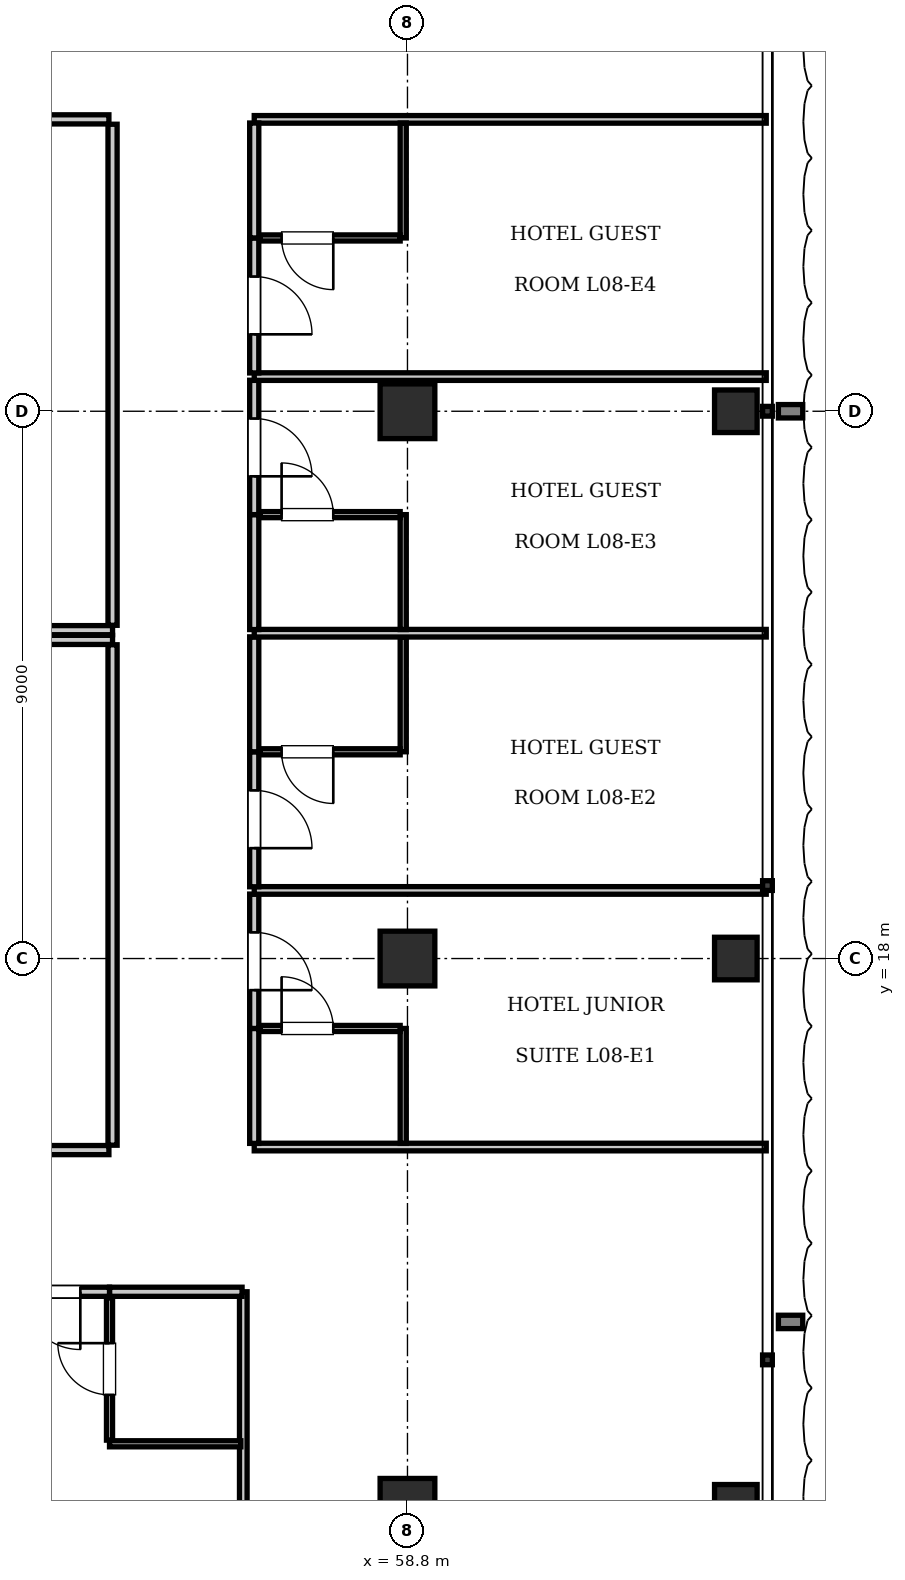
"""IFC4 building model, lengths in metres.
Left out: names, types, materials, properties, quantities, classifications, styles, units other than length and angle.
Written with IfcOpenShell. Run it as: python <this file> out.ifc"""

import sys

from ifc_helpers import new_model, si_unit, direction, frame, frame_2d, origin, origin_2d, place, context, subcontext, project, spatial, rectangle, i_section, extrude, element, fill, save


model = new_model("IFC4")
c1 = context("Model", 3, precision=1e-05, world=origin(), true_north=direction((0.0, 1.0)))
c2 = subcontext(c1, "Body", "Model", "MODEL_VIEW")
j1 = project(units=[si_unit("LENGTHUNIT", "METRE"), si_unit("PLANEANGLEUNIT", "RADIAN")], contexts=[c1])
p1 = place(None, origin())
s1 = spatial("IfcSite", under=j1, at=p1, CompositionType="ELEMENT")
p2 = place(p1, origin())
s2 = spatial("IfcBuilding", under=s1, at=p2, CompositionType="ELEMENT")
p3 = place(p2, frame((0.0, 0.0, 38.5)))
s3 = spatial("IfcBuildingStorey", under=s2, at=p3, CompositionType="ELEMENT", Elevation=38.5)
for number, where, z_axis, x_axis in (
    (1, (58.8, 9.0, 0.0), (0.0, 0.0, 1.0), (1.0, 0.0, 0.0)),
    (2, (58.8, 18.0, 0.0), (0.0, 0.0, 1.0), (1.0, 0.0, 0.0)),
    (3, (58.8, 27.0, 0.0), (0.0, 0.0, 1.0), (1.0, 0.0, 0.0)),
):
    element("IfcColumn", number, at=place(p3, frame(where, z_axis=z_axis, x_axis=x_axis)), inside=s3, PredefinedType="COLUMN", context=c2, shape_type="SweptSolid", body=[
        extrude(rectangle(XDim=0.9, YDim=0.9, at=origin_2d()), origin(), (0.0, 0.0, 1.0), 3.85),
    ])
for number, where, z_axis, x_axis in (
    (4, (64.2, 9.0, 0.0), (0.0, 0.0, 1.0), (1.0, 0.0, 0.0)),
    (5, (64.2, 18.0, 0.0), (0.0, 0.0, 1.0), (1.0, 0.0, 0.0)),
    (6, (64.2, 27.0, 0.0), (0.0, 0.0, 1.0), (1.0, 0.0, 0.0)),
):
    element("IfcColumn", number, at=place(p3, frame(where, z_axis=z_axis, x_axis=x_axis)), inside=s3, PredefinedType="COLUMN", context=c2, shape_type="SweptSolid", body=[
        extrude(i_section(OverallWidth=0.7, OverallDepth=0.7, WebThickness=0.028, FlangeThickness=0.044, at=origin_2d()), origin(), (0.0, 0.0, 1.0), 3.85),
    ])
p4 = place(p3, frame((21.65, 23.4, 0.0), z_axis=(0.0, 0.0, 1.0), x_axis=(1.0, 0.0, 0.0)))
e7 = element("IfcWall", 7, at=p4, inside=s3, PredefinedType="PARTITIONING", context=c2, shape_type="SweptSolid", body=[
    extrude(rectangle(XDim=32.3, YDim=0.15, at=frame_2d((16.15, 0.0))), origin(), (0.0, 0.0, 1.0), 3.61),
])
p5 = place(p3, frame((53.95, 23.48, 0.0), z_axis=(0.0, 0.0, 1.0), x_axis=(0.0, 1.0, 0.0)))
e8 = element("IfcWall", 8, at=p5, inside=s3, PredefinedType="PARTITIONING", context=c2, shape_type="SweptSolid", body=[
    extrude(rectangle(XDim=8.24, YDim=0.15, at=frame_2d((4.12, 0.0))), origin(), (0.0, 0.0, 1.0), 3.61),
])
p6 = place(p3, frame((42.998, 31.8, 0.0), z_axis=(0.0, 0.0, 1.0), x_axis=(1.0, 0.0, 0.0)))
e9 = element("IfcWall", 9, at=p6, inside=s3, PredefinedType="PARTITIONING", context=c2, shape_type="SweptSolid", body=[
    extrude(rectangle(XDim=10.892, YDim=0.15, at=frame_2d((5.446, 0.0))), origin(), (0.0, 0.0, 1.0), 3.61),
])
p7 = place(p6, frame((4.996, 0.0, 0.0)))
e10 = element("IfcOpeningElement", 10, at=p7, cuts=e9, PredefinedType="OPENING", context=c2, shape_type="SweptSolid", body=[
    extrude(rectangle(XDim=0.9, YDim=2.1, at=frame_2d((0.45, 1.05))), frame((0.0, 0.085, 0.0), z_axis=(0.0, -1.0, 0.0), x_axis=(1.0, 0.0, 0.0)), (0.0, 0.0, 1.0), 0.17),
])
p8 = place(p3, frame((21.65, 23.24, 0.0), z_axis=(0.0, 0.0, 1.0), x_axis=(1.0, 0.0, 0.0)))
e11 = element("IfcWall", 11, at=p8, inside=s3, PredefinedType="PARTITIONING", context=c2, shape_type="SweptSolid", body=[
    extrude(rectangle(XDim=32.3, YDim=0.15, at=frame_2d((16.15, 0.0))), origin(), (0.0, 0.0, 1.0), 3.61),
])
p9 = place(p3, frame((53.95, 14.93, 0.0), z_axis=(0.0, 0.0, 1.0), x_axis=(0.0, 1.0, 0.0)))
e12 = element("IfcWall", 12, at=p9, inside=s3, PredefinedType="PARTITIONING", context=c2, shape_type="SweptSolid", body=[
    extrude(rectangle(XDim=8.23, YDim=0.15, at=frame_2d((4.115, 0.0))), origin(), (0.0, 0.0, 1.0), 3.61),
])
p10 = place(p3, frame((33.631, 14.85, 0.0), z_axis=(0.0, 0.0, 1.0), x_axis=(1.0, 0.0, 0.0)))
e13 = element("IfcWall", 13, at=p10, inside=s3, PredefinedType="PARTITIONING", context=c2, shape_type="SweptSolid", body=[
    extrude(rectangle(XDim=20.259, YDim=0.15, at=frame_2d((10.129, 0.0))), origin(), (0.0, 0.0, 1.0), 3.61),
])
p11 = place(p10, frame((9.679, 0.0, 0.0)))
e14 = element("IfcOpeningElement", 14, at=p11, cuts=e13, PredefinedType="OPENING", context=c2, shape_type="SweptSolid", body=[
    extrude(rectangle(XDim=0.9, YDim=2.1, at=frame_2d((0.45, 1.05))), frame((0.0, 0.085, 0.0), z_axis=(0.0, -1.0, 0.0), x_axis=(1.0, 0.0, 0.0)), (0.0, 0.0, 1.0), 0.17),
])
p12 = place(p3, frame((56.1, 0.1, 0.0), z_axis=(0.0, 0.0, 1.0), x_axis=(0.0, 1.0, 0.0)))
e15 = element("IfcWall", 15, at=p12, inside=s3, PredefinedType="PARTITIONING", context=c2, shape_type="SweptSolid", body=[
    extrude(rectangle(XDim=12.42, YDim=0.125, at=frame_2d((6.21, 0.0))), origin(), (0.0, 0.0, 1.0), 3.61),
])
p13 = place(p3, frame((53.9, 12.52, 0.0), z_axis=(0.0, 0.0, 1.0), x_axis=(1.0, 0.0, 0.0)))
e16 = element("IfcWall", 16, at=p13, inside=s3, PredefinedType="PARTITIONING", context=c2, shape_type="SweptSolid", body=[
    extrude(rectangle(XDim=2.18, YDim=0.15, at=frame_2d((1.09, 0.0))), origin(), (0.0, 0.0, 1.0), 3.61),
])
p14 = place(p3, frame((53.9, 10.02, 0.0), z_axis=(0.0, 0.0, 1.0), x_axis=(1.0, 0.0, 0.0)))
e17 = element("IfcWall", 17, at=p14, inside=s3, PredefinedType="PARTITIONING", context=c2, shape_type="SweptSolid", body=[
    extrude(rectangle(XDim=2.16, YDim=0.1, at=frame_2d((1.08, 0.0))), origin(), (0.0, 0.0, 1.0), 3.61),
])
p15 = place(p3, frame((53.9, 10.08, 0.0), z_axis=(0.0, 0.0, 1.0), x_axis=(0.0, 1.0, 0.0)))
e18 = element("IfcWall", 18, at=p15, inside=s3, PredefinedType="PARTITIONING", context=c2, shape_type="SweptSolid", body=[
    extrude(rectangle(XDim=2.34, YDim=0.1, at=frame_2d((1.17, 0.0))), origin(), (0.0, 0.0, 1.0), 3.61),
])
p16 = place(p15, frame((0.745, 0.0, 0.0)))
e19 = element("IfcOpeningElement", 19, at=p16, cuts=e18, PredefinedType="OPENING", context=c2, shape_type="SweptSolid", body=[
    extrude(rectangle(XDim=0.85, YDim=2.1, at=frame_2d((0.425, 1.05))), frame((0.0, 0.06, 0.0), z_axis=(0.0, -1.0, 0.0), x_axis=(1.0, 0.0, 0.0)), (0.0, 0.0, 1.0), 0.12),
])
p17 = place(p3, frame((51.99, 12.52, 0.0), z_axis=(0.0, 0.0, 1.0), x_axis=(1.0, 0.0, 0.0)))
e20 = element("IfcWall", 20, at=p17, inside=s3, PredefinedType="PARTITIONING", context=c2, shape_type="SweptSolid", body=[
    extrude(rectangle(XDim=1.91, YDim=0.15, at=frame_2d((0.955, 0.0))), origin(), (0.0, 0.0, 1.0), 3.61),
])
p18 = place(p17, frame((0.48, 0.0, 0.0)))
e21 = element("IfcOpeningElement", 21, at=p18, cuts=e20, PredefinedType="OPENING", context=c2, shape_type="SweptSolid", body=[
    extrude(rectangle(XDim=0.95, YDim=2.15, at=frame_2d((0.475, 1.075))), frame((0.0, 0.085, 0.0), z_axis=(0.0, -1.0, 0.0), x_axis=(1.0, 0.0, 0.0)), (0.0, 0.0, 1.0), 0.17),
])
for number, where, z_axis, x_axis in (
    (22, (56.28, 14.9, 0.0), (0.0, 0.0, 1.0), (1.0, 0.0, 0.0)),
    (23, (56.28, 31.8, 0.0), (0.0, 0.0, 1.0), (1.0, 0.0, 0.0)),
):
    element("IfcWall", number, at=place(p3, frame(where, z_axis=z_axis, x_axis=x_axis)), inside=s3, PredefinedType="PARTITIONING", context=c2, shape_type="SweptSolid", body=[
        extrude(rectangle(XDim=8.42, YDim=0.125, at=frame_2d((4.21, 0.0))), origin(), (0.0, 0.0, 1.0), 3.61),
    ])
p19 = place(p3, frame((56.28, 14.96, 0.0), z_axis=(0.0, 0.0, 1.0), x_axis=(0.0, 1.0, 0.0)))
e24 = element("IfcWall", 24, at=p19, inside=s3, PredefinedType="PARTITIONING", context=c2, shape_type="SweptSolid", body=[
    extrude(rectangle(XDim=1.89, YDim=0.15, at=frame_2d((0.945, 0.0))), origin(), (0.0, 0.0, 1.0), 3.61),
])
p20 = place(p3, frame((56.28, 16.85, 0.0), z_axis=(0.0, 0.0, 1.0), x_axis=(0.0, 1.0, 0.0)))
e25 = element("IfcWall", 25, at=p20, inside=s3, PredefinedType="PARTITIONING", context=c2, shape_type="SweptSolid", body=[
    extrude(rectangle(XDim=2.21, YDim=0.15, at=frame_2d((1.105, 0.0))), origin(), (0.0, 0.0, 1.0), 3.61),
])
p21 = place(p20, frame((0.63, 0.0, 0.0)))
e26 = element("IfcOpeningElement", 26, at=p21, cuts=e25, PredefinedType="OPENING", context=c2, shape_type="SweptSolid", body=[
    extrude(rectangle(XDim=0.95, YDim=2.15, at=frame_2d((0.475, 1.075))), frame((0.0, 0.085, 0.0), z_axis=(0.0, -1.0, 0.0), x_axis=(1.0, 0.0, 0.0)), (0.0, 0.0, 1.0), 0.17),
])
p22 = place(p3, frame((58.73, 14.96, 0.0), z_axis=(0.0, 0.0, 1.0), x_axis=(0.0, 1.0, 0.0)))
e27 = element("IfcWall", 27, at=p22, inside=s3, PredefinedType="PARTITIONING", context=c2, shape_type="SweptSolid", body=[
    extrude(rectangle(XDim=1.89, YDim=0.1, at=frame_2d((0.945, 0.0))), origin(), (0.0, 0.0, 1.0), 2.988),
])
p23 = place(p3, frame((56.38, 16.85, 0.0), z_axis=(0.0, 0.0, 1.0), x_axis=(1.0, 0.0, 0.0)))
e28 = element("IfcWall", 28, at=p23, inside=s3, PredefinedType="PARTITIONING", context=c2, shape_type="SweptSolid", body=[
    extrude(rectangle(XDim=2.3, YDim=0.1, at=frame_2d((1.15, 0.0))), origin(), (0.0, 0.0, 1.0), 3.61),
])
p24 = place(p23, frame((0.35, 0.0, 0.0)))
e29 = element("IfcOpeningElement", 29, at=p24, cuts=e28, PredefinedType="OPENING", context=c2, shape_type="SweptSolid", body=[
    extrude(rectangle(XDim=0.85, YDim=2.1, at=frame_2d((0.425, 1.05))), frame((0.0, 0.06, 0.0), z_axis=(0.0, -1.0, 0.0), x_axis=(1.0, 0.0, 0.0)), (0.0, 0.0, 1.0), 0.12),
])
p25 = place(p3, frame((56.28, 19.12, 0.0), z_axis=(0.0, 0.0, 1.0), x_axis=(1.0, 0.0, 0.0)))
e30 = element("IfcWall", 30, at=p25, inside=s3, PredefinedType="PARTITIONING", context=c2, shape_type="SweptSolid", body=[
    extrude(rectangle(XDim=8.42, YDim=0.125, at=frame_2d((4.21, 0.0))), origin(), (0.0, 0.0, 1.0), 3.61),
])
p26 = place(p3, frame((56.28, 19.18, 0.0), z_axis=(0.0, 0.0, 1.0), x_axis=(0.0, 1.0, 0.0)))
e31 = element("IfcWall", 31, at=p26, inside=s3, PredefinedType="PARTITIONING", context=c2, shape_type="SweptSolid", body=[
    extrude(rectangle(XDim=2.22, YDim=0.15, at=frame_2d((1.11, 0.0))), origin(), (0.0, 0.0, 1.0), 3.61),
])
p27 = place(p26, frame((0.635, 0.0, 0.0)))
e32 = element("IfcOpeningElement", 32, at=p27, cuts=e31, PredefinedType="OPENING", context=c2, shape_type="SweptSolid", body=[
    extrude(rectangle(XDim=0.95, YDim=2.15, at=frame_2d((0.475, 1.075))), frame((0.0, 0.085, 0.0), z_axis=(0.0, -1.0, 0.0), x_axis=(1.0, 0.0, 0.0)), (0.0, 0.0, 1.0), 0.17),
])
p28 = place(p3, frame((56.28, 21.4, 0.0), z_axis=(0.0, 0.0, 1.0), x_axis=(0.0, 1.0, 0.0)))
e33 = element("IfcWall", 33, at=p28, inside=s3, PredefinedType="PARTITIONING", context=c2, shape_type="SweptSolid", body=[
    extrude(rectangle(XDim=1.89, YDim=0.15, at=frame_2d((0.945, 0.0))), origin(), (0.0, 0.0, 1.0), 3.61),
])
p29 = place(p3, frame((58.73, 21.4, 0.0), z_axis=(0.0, 0.0, 1.0), x_axis=(0.0, 1.0, 0.0)))
e34 = element("IfcWall", 34, at=p29, inside=s3, PredefinedType="PARTITIONING", context=c2, shape_type="SweptSolid", body=[
    extrude(rectangle(XDim=1.89, YDim=0.1, at=frame_2d((0.945, 0.0))), origin(), (0.0, 0.0, 1.0), 2.988),
])
p30 = place(p3, frame((56.38, 21.4, 0.0), z_axis=(0.0, 0.0, 1.0), x_axis=(1.0, 0.0, 0.0)))
e35 = element("IfcWall", 35, at=p30, inside=s3, PredefinedType="PARTITIONING", context=c2, shape_type="SweptSolid", body=[
    extrude(rectangle(XDim=2.3, YDim=0.1, at=frame_2d((1.15, 0.0))), origin(), (0.0, 0.0, 1.0), 3.61),
])
p31 = place(p30, frame((0.35, 0.0, 0.0)))
e36 = element("IfcOpeningElement", 36, at=p31, cuts=e35, PredefinedType="OPENING", context=c2, shape_type="SweptSolid", body=[
    extrude(rectangle(XDim=0.85, YDim=2.1, at=frame_2d((0.425, 1.05))), frame((0.0, 0.06, 0.0), z_axis=(0.0, -1.0, 0.0), x_axis=(1.0, 0.0, 0.0)), (0.0, 0.0, 1.0), 0.12),
])
p32 = place(p3, frame((56.28, 23.35, 0.0), z_axis=(0.0, 0.0, 1.0), x_axis=(1.0, 0.0, 0.0)))
e37 = element("IfcWall", 37, at=p32, inside=s3, PredefinedType="PARTITIONING", context=c2, shape_type="SweptSolid", body=[
    extrude(rectangle(XDim=8.42, YDim=0.125, at=frame_2d((4.21, 0.0))), origin(), (0.0, 0.0, 1.0), 3.61),
])
p33 = place(p3, frame((56.28, 23.41, 0.0), z_axis=(0.0, 0.0, 1.0), x_axis=(0.0, 1.0, 0.0)))
e38 = element("IfcWall", 38, at=p33, inside=s3, PredefinedType="PARTITIONING", context=c2, shape_type="SweptSolid", body=[
    extrude(rectangle(XDim=1.89, YDim=0.15, at=frame_2d((0.945, 0.0))), origin(), (0.0, 0.0, 1.0), 3.61),
])
p34 = place(p3, frame((56.28, 25.3, 0.0), z_axis=(0.0, 0.0, 1.0), x_axis=(0.0, 1.0, 0.0)))
e39 = element("IfcWall", 39, at=p34, inside=s3, PredefinedType="PARTITIONING", context=c2, shape_type="SweptSolid", body=[
    extrude(rectangle(XDim=2.21, YDim=0.15, at=frame_2d((1.105, 0.0))), origin(), (0.0, 0.0, 1.0), 3.61),
])
p35 = place(p34, frame((0.63, 0.0, 0.0)))
e40 = element("IfcOpeningElement", 40, at=p35, cuts=e39, PredefinedType="OPENING", context=c2, shape_type="SweptSolid", body=[
    extrude(rectangle(XDim=0.95, YDim=2.15, at=frame_2d((0.475, 1.075))), frame((0.0, 0.085, 0.0), z_axis=(0.0, -1.0, 0.0), x_axis=(1.0, 0.0, 0.0)), (0.0, 0.0, 1.0), 0.17),
])
p36 = place(p3, frame((58.73, 23.41, 0.0), z_axis=(0.0, 0.0, 1.0), x_axis=(0.0, 1.0, 0.0)))
e41 = element("IfcWall", 41, at=p36, inside=s3, PredefinedType="PARTITIONING", context=c2, shape_type="SweptSolid", body=[
    extrude(rectangle(XDim=1.89, YDim=0.1, at=frame_2d((0.945, 0.0))), origin(), (0.0, 0.0, 1.0), 2.988),
])
p37 = place(p3, frame((56.38, 25.3, 0.0), z_axis=(0.0, 0.0, 1.0), x_axis=(1.0, 0.0, 0.0)))
e42 = element("IfcWall", 42, at=p37, inside=s3, PredefinedType="PARTITIONING", context=c2, shape_type="SweptSolid", body=[
    extrude(rectangle(XDim=2.3, YDim=0.1, at=frame_2d((1.15, 0.0))), origin(), (0.0, 0.0, 1.0), 3.61),
])
p38 = place(p37, frame((0.35, 0.0, 0.0)))
e43 = element("IfcOpeningElement", 43, at=p38, cuts=e42, PredefinedType="OPENING", context=c2, shape_type="SweptSolid", body=[
    extrude(rectangle(XDim=0.85, YDim=2.1, at=frame_2d((0.425, 1.05))), frame((0.0, 0.06, 0.0), z_axis=(0.0, -1.0, 0.0), x_axis=(1.0, 0.0, 0.0)), (0.0, 0.0, 1.0), 0.12),
])
p39 = place(p3, frame((56.28, 27.57, 0.0), z_axis=(0.0, 0.0, 1.0), x_axis=(1.0, 0.0, 0.0)))
e44 = element("IfcWall", 44, at=p39, inside=s3, PredefinedType="PARTITIONING", context=c2, shape_type="SweptSolid", body=[
    extrude(rectangle(XDim=8.42, YDim=0.125, at=frame_2d((4.21, 0.0))), origin(), (0.0, 0.0, 1.0), 3.61),
])
p40 = place(p3, frame((56.28, 27.63, 0.0), z_axis=(0.0, 0.0, 1.0), x_axis=(0.0, 1.0, 0.0)))
e45 = element("IfcWall", 45, at=p40, inside=s3, PredefinedType="PARTITIONING", context=c2, shape_type="SweptSolid", body=[
    extrude(rectangle(XDim=2.22, YDim=0.15, at=frame_2d((1.11, 0.0))), origin(), (0.0, 0.0, 1.0), 3.61),
])
p41 = place(p40, frame((0.635, 0.0, 0.0)))
e46 = element("IfcOpeningElement", 46, at=p41, cuts=e45, PredefinedType="OPENING", context=c2, shape_type="SweptSolid", body=[
    extrude(rectangle(XDim=0.95, YDim=2.15, at=frame_2d((0.475, 1.075))), frame((0.0, 0.085, 0.0), z_axis=(0.0, -1.0, 0.0), x_axis=(1.0, 0.0, 0.0)), (0.0, 0.0, 1.0), 0.17),
])
p42 = place(p3, frame((56.28, 29.85, 0.0), z_axis=(0.0, 0.0, 1.0), x_axis=(0.0, 1.0, 0.0)))
e47 = element("IfcWall", 47, at=p42, inside=s3, PredefinedType="PARTITIONING", context=c2, shape_type="SweptSolid", body=[
    extrude(rectangle(XDim=1.89, YDim=0.15, at=frame_2d((0.945, 0.0))), origin(), (0.0, 0.0, 1.0), 3.61),
])
p43 = place(p3, frame((58.73, 29.85, 0.0), z_axis=(0.0, 0.0, 1.0), x_axis=(0.0, 1.0, 0.0)))
e48 = element("IfcWall", 48, at=p43, inside=s3, PredefinedType="PARTITIONING", context=c2, shape_type="SweptSolid", body=[
    extrude(rectangle(XDim=1.89, YDim=0.1, at=frame_2d((0.945, 0.0))), origin(), (0.0, 0.0, 1.0), 2.988),
])
p44 = place(p3, frame((56.38, 29.85, 0.0), z_axis=(0.0, 0.0, 1.0), x_axis=(1.0, 0.0, 0.0)))
e49 = element("IfcWall", 49, at=p44, inside=s3, PredefinedType="PARTITIONING", context=c2, shape_type="SweptSolid", body=[
    extrude(rectangle(XDim=2.3, YDim=0.1, at=frame_2d((1.15, 0.0))), origin(), (0.0, 0.0, 1.0), 3.61),
])
p45 = place(p44, frame((0.35, 0.0, 0.0)))
e50 = element("IfcOpeningElement", 50, at=p45, cuts=e49, PredefinedType="OPENING", context=c2, shape_type="SweptSolid", body=[
    extrude(rectangle(XDim=0.85, YDim=2.1, at=frame_2d((0.425, 1.05))), frame((0.0, 0.06, 0.0), z_axis=(0.0, -1.0, 0.0), x_axis=(1.0, 0.0, 0.0)), (0.0, 0.0, 1.0), 0.12),
])
p46 = place(p16, origin())
e51 = element("IfcDoor", 51, at=p46, inside=s3, OperationType="SINGLE_SWING_RIGHT", PredefinedType="DOOR", context=c2, shape_type="SweptSolid", body=[
    extrude(rectangle(XDim=0.85, YDim=2.1, at=frame_2d((0.425, 1.05))), frame((0.0, 0.025, 0.0), z_axis=(0.0, -1.0, 0.0), x_axis=(1.0, 0.0, 0.0)), (0.0, 0.0, 1.0), 0.05),
])
fill(e19, e51)
p47 = place(p18, frame((0.95, 0.0, 0.0), z_axis=(0.0, 0.0, 1.0), x_axis=(-1.0, 0.0, 0.0)))
e52 = element("IfcDoor", 52, at=p47, inside=s3, OperationType="SINGLE_SWING_LEFT", PredefinedType="DOOR", context=c2, shape_type="SweptSolid", body=[
    extrude(rectangle(XDim=0.95, YDim=2.15, at=frame_2d((0.475, 1.075))), frame((0.0, 0.025, 0.0), z_axis=(0.0, -1.0, 0.0), x_axis=(1.0, 0.0, 0.0)), (0.0, 0.0, 1.0), 0.05),
])
fill(e21, e52)
p48 = place(p24, origin())
e53 = element("IfcDoor", 53, at=p48, inside=s3, OperationType="SINGLE_SWING_LEFT", PredefinedType="DOOR", context=c2, shape_type="SweptSolid", body=[
    extrude(rectangle(XDim=0.85, YDim=2.1, at=frame_2d((0.425, 1.05))), frame((0.0, 0.025, 0.0), z_axis=(0.0, -1.0, 0.0), x_axis=(1.0, 0.0, 0.0)), (0.0, 0.0, 1.0), 0.05),
])
fill(e29, e53)
p49 = place(p21, frame((0.95, 0.0, 0.0), z_axis=(0.0, 0.0, 1.0), x_axis=(-1.0, 0.0, 0.0)))
e54 = element("IfcDoor", 54, at=p49, inside=s3, OperationType="SINGLE_SWING_RIGHT", PredefinedType="DOOR", context=c2, shape_type="SweptSolid", body=[
    extrude(rectangle(XDim=0.95, YDim=2.15, at=frame_2d((0.475, 1.075))), frame((0.0, 0.025, 0.0), z_axis=(0.0, -1.0, 0.0), x_axis=(1.0, 0.0, 0.0)), (0.0, 0.0, 1.0), 0.05),
])
fill(e26, e54)
p50 = place(p31, frame((0.85, 0.0, 0.0), z_axis=(0.0, 0.0, 1.0), x_axis=(-1.0, 0.0, 0.0)))
e55 = element("IfcDoor", 55, at=p50, inside=s3, OperationType="SINGLE_SWING_LEFT", PredefinedType="DOOR", context=c2, shape_type="SweptSolid", body=[
    extrude(rectangle(XDim=0.85, YDim=2.1, at=frame_2d((0.425, 1.05))), frame((0.0, 0.025, 0.0), z_axis=(0.0, -1.0, 0.0), x_axis=(1.0, 0.0, 0.0)), (0.0, 0.0, 1.0), 0.05),
])
fill(e36, e55)
p51 = place(p27, frame((0.95, 0.0, 0.0), z_axis=(0.0, 0.0, 1.0), x_axis=(-1.0, 0.0, 0.0)))
e56 = element("IfcDoor", 56, at=p51, inside=s3, OperationType="SINGLE_SWING_RIGHT", PredefinedType="DOOR", context=c2, shape_type="SweptSolid", body=[
    extrude(rectangle(XDim=0.95, YDim=2.15, at=frame_2d((0.475, 1.075))), frame((0.0, 0.025, 0.0), z_axis=(0.0, -1.0, 0.0), x_axis=(1.0, 0.0, 0.0)), (0.0, 0.0, 1.0), 0.05),
])
fill(e32, e56)
p52 = place(p38, origin())
e57 = element("IfcDoor", 57, at=p52, inside=s3, OperationType="SINGLE_SWING_LEFT", PredefinedType="DOOR", context=c2, shape_type="SweptSolid", body=[
    extrude(rectangle(XDim=0.85, YDim=2.1, at=frame_2d((0.425, 1.05))), frame((0.0, 0.025, 0.0), z_axis=(0.0, -1.0, 0.0), x_axis=(1.0, 0.0, 0.0)), (0.0, 0.0, 1.0), 0.05),
])
fill(e43, e57)
p53 = place(p35, frame((0.95, 0.0, 0.0), z_axis=(0.0, 0.0, 1.0), x_axis=(-1.0, 0.0, 0.0)))
e58 = element("IfcDoor", 58, at=p53, inside=s3, OperationType="SINGLE_SWING_RIGHT", PredefinedType="DOOR", context=c2, shape_type="SweptSolid", body=[
    extrude(rectangle(XDim=0.95, YDim=2.15, at=frame_2d((0.475, 1.075))), frame((0.0, 0.025, 0.0), z_axis=(0.0, -1.0, 0.0), x_axis=(1.0, 0.0, 0.0)), (0.0, 0.0, 1.0), 0.05),
])
fill(e40, e58)
p54 = place(p45, frame((0.85, 0.0, 0.0), z_axis=(0.0, 0.0, 1.0), x_axis=(-1.0, 0.0, 0.0)))
e59 = element("IfcDoor", 59, at=p54, inside=s3, OperationType="SINGLE_SWING_LEFT", PredefinedType="DOOR", context=c2, shape_type="SweptSolid", body=[
    extrude(rectangle(XDim=0.85, YDim=2.1, at=frame_2d((0.425, 1.05))), frame((0.0, 0.025, 0.0), z_axis=(0.0, -1.0, 0.0), x_axis=(1.0, 0.0, 0.0)), (0.0, 0.0, 1.0), 0.05),
])
fill(e50, e59)
p55 = place(p41, frame((0.95, 0.0, 0.0), z_axis=(0.0, 0.0, 1.0), x_axis=(-1.0, 0.0, 0.0)))
e60 = element("IfcDoor", 60, at=p55, inside=s3, OperationType="SINGLE_SWING_RIGHT", PredefinedType="DOOR", context=c2, shape_type="SweptSolid", body=[
    extrude(rectangle(XDim=0.95, YDim=2.15, at=frame_2d((0.475, 1.075))), frame((0.0, 0.025, 0.0), z_axis=(0.0, -1.0, 0.0), x_axis=(1.0, 0.0, 0.0)), (0.0, 0.0, 1.0), 0.05),
])
fill(e46, e60)
save(model, sys.argv[1])
